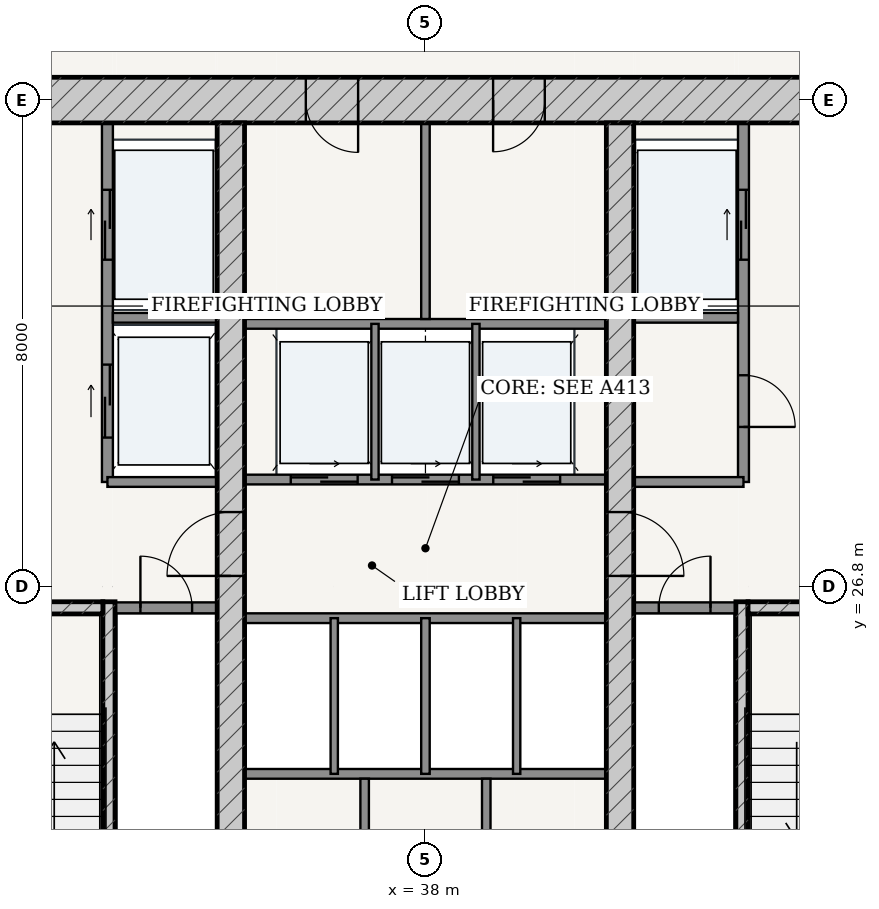
"""IFC4 building model, lengths in metres.
Left out: names, types, materials, properties, quantities, classifications, styles, units other than length and angle.
Written with IfcOpenShell. Run it as: python <this file> out.ifc"""

import sys

from ifc_helpers import new_model, si_unit, direction, frame, frame_2d, origin, place, context, subcontext, project, spatial, rectangle, extrude, source, transform, mapped, element, fill, save


model = new_model("IFC4")
c1 = context("Model", 3, precision=1e-05, world=origin(), true_north=direction((-0.2419218956, 0.970295726276)))
c2 = subcontext(c1, "Body", "Model", "MODEL_VIEW")
j1 = project(units=[si_unit("LENGTHUNIT", "METRE"), si_unit("PLANEANGLEUNIT", "RADIAN")], contexts=[c1])
p1 = place(None, origin())
s1 = spatial("IfcSite", under=j1, at=p1, CompositionType="ELEMENT")
p2 = place(p1, origin())
s2 = spatial("IfcBuilding", under=s1, at=p2, CompositionType="ELEMENT")
p3 = place(p2, frame((0.0, 0.0, 67.2)))
s3 = spatial("IfcBuildingStorey", under=s2, at=p3, CompositionType="ELEMENT", Elevation=67.2)
p4 = place(p3, frame((28.625, 34.8, 0.0), z_axis=(0.0, 0.0, 1.0), x_axis=(1.0, 0.0, 0.0)))
e1 = element("IfcWall", 1, at=p4, inside=s3, PredefinedType="SHEAR", context=c2, shape_type="SweptSolid", body=[
    extrude(rectangle(XDim=18.75, YDim=0.75, at=frame_2d((9.375, 0.0))), origin(), (0.0, 0.0, 1.0), 3.32),
])
p5 = place(p4, frame((7.407, 0.0, 0.0)))
e2 = element("IfcOpeningElement", 2, at=p5, cuts=e1, PredefinedType="OPENING", context=c2, shape_type="SweptSolid", body=[
    extrude(rectangle(XDim=0.86, YDim=2.1, at=frame_2d((0.43, 1.05))), frame((0.0, 0.385, 0.0), z_axis=(0.0, -1.0, 0.0), x_axis=(1.0, 0.0, 0.0)), (0.0, 0.0, 1.0), 0.77),
])
p6 = place(p4, frame((10.488, 0.0, 0.0)))
e3 = element("IfcOpeningElement", 3, at=p6, cuts=e1, PredefinedType="OPENING", context=c2, shape_type="SweptSolid", body=[
    extrude(rectangle(XDim=0.85, YDim=2.1, at=frame_2d((0.425, 1.05))), frame((0.0, 0.385, 0.0), z_axis=(0.0, -1.0, 0.0), x_axis=(1.0, 0.0, 0.0)), (0.0, 0.0, 1.0), 0.77),
])
p7 = place(p3, frame((32.795, 19.175, 0.0), z_axis=(0.0, 0.0, 1.0), x_axis=(0.0, 1.0, 0.0)))
e4 = element("IfcWall", 4, at=p7, inside=s3, PredefinedType="SOLIDWALL", context=c2, shape_type="SweptSolid", body=[
    extrude(rectangle(XDim=7.375, YDim=0.2, at=frame_2d((3.688, 0.0))), origin(), (0.0, 0.0, 1.0), 3.32),
])
p8 = place(p3, frame((29.375, 26.45, 0.0), z_axis=(0.0, 0.0, 1.0), x_axis=(1.0, 0.0, 0.0)))
e5 = element("IfcWall", 5, at=p8, inside=s3, PredefinedType="SOLIDWALL", context=c2, shape_type="SweptSolid", body=[
    extrude(rectangle(XDim=3.32, YDim=0.2, at=frame_2d((1.66, 0.0))), origin(), (0.0, 0.0, 1.0), 3.32),
])
p9 = place(p8, frame((1.185, 0.0, 0.0)))
e6 = element("IfcOpeningElement", 6, at=p9, cuts=e5, PredefinedType="OPENING", context=c2, shape_type="SweptSolid", body=[
    extrude(rectangle(XDim=0.95, YDim=2.15, at=frame_2d((0.475, 1.075))), frame((0.0, 0.11, 0.0), z_axis=(0.0, -1.0, 0.0), x_axis=(1.0, 0.0, 0.0)), (0.0, 0.0, 1.0), 0.22),
])
p10 = place(p3, frame((43.205, 19.175, 0.0), z_axis=(0.0, 0.0, 1.0), x_axis=(0.0, 1.0, 0.0)))
e7 = element("IfcWall", 7, at=p10, inside=s3, PredefinedType="SOLIDWALL", context=c2, shape_type="SweptSolid", body=[
    extrude(rectangle(XDim=7.375, YDim=0.2, at=frame_2d((3.688, 0.0))), origin(), (0.0, 0.0, 1.0), 3.32),
])
p11 = place(p3, frame((43.305, 26.45, 0.0), z_axis=(0.0, 0.0, 1.0), x_axis=(1.0, 0.0, 0.0)))
e8 = element("IfcWall", 8, at=p11, inside=s3, PredefinedType="SOLIDWALL", context=c2, shape_type="SweptSolid", body=[
    extrude(rectangle(XDim=3.32, YDim=0.2, at=frame_2d((1.66, 0.0))), origin(), (0.0, 0.0, 1.0), 3.32),
])
p12 = place(p11, frame((1.185, 0.0, 0.0)))
e9 = element("IfcOpeningElement", 9, at=p12, cuts=e8, PredefinedType="OPENING", context=c2, shape_type="SweptSolid", body=[
    extrude(rectangle(XDim=0.95, YDim=2.15, at=frame_2d((0.475, 1.075))), frame((0.0, 0.11, 0.0), z_axis=(0.0, -1.0, 0.0), x_axis=(1.0, 0.0, 0.0)), (0.0, 0.0, 1.0), 0.22),
])
p13 = place(p3, frame((34.8, 19.175, 0.0), z_axis=(0.0, 0.0, 1.0), x_axis=(0.0, 1.0, 0.0)))
e10 = element("IfcWall", 10, at=p13, inside=s3, PredefinedType="SHEAR", context=c2, shape_type="SweptSolid", body=[
    extrude(rectangle(XDim=15.25, YDim=0.45, at=frame_2d((7.625, 0.0))), origin(), (0.0, 0.0, 1.0), 3.32),
])
p14 = place(p13, frame((7.8, 0.0, 0.0)))
e11 = element("IfcOpeningElement", 11, at=p14, cuts=e10, PredefinedType="OPENING", context=c2, shape_type="SweptSolid", body=[
    extrude(rectangle(XDim=1.05, YDim=2.15, at=frame_2d((0.525, 1.075))), frame((0.0, 0.235, 0.0), z_axis=(0.0, -1.0, 0.0), x_axis=(1.0, 0.0, 0.0)), (0.0, 0.0, 1.0), 0.47),
])
p15 = place(p3, frame((41.2, 19.175, 0.0), z_axis=(0.0, 0.0, 1.0), x_axis=(0.0, 1.0, 0.0)))
e12 = element("IfcWall", 12, at=p15, inside=s3, PredefinedType="SHEAR", context=c2, shape_type="SweptSolid", body=[
    extrude(rectangle(XDim=15.25, YDim=0.45, at=frame_2d((7.625, 0.0))), origin(), (0.0, 0.0, 1.0), 3.32),
])
p16 = place(p15, frame((7.8, 0.0, 0.0)))
e13 = element("IfcOpeningElement", 13, at=p16, cuts=e12, PredefinedType="OPENING", context=c2, shape_type="SweptSolid", body=[
    extrude(rectangle(XDim=1.05, YDim=2.15, at=frame_2d((0.525, 1.075))), frame((0.0, 0.235, 0.0), z_axis=(0.0, -1.0, 0.0), x_axis=(1.0, 0.0, 0.0)), (0.0, 0.0, 1.0), 0.47),
])
p17 = place(p3, frame((32.9, 26.45, 0.0), z_axis=(0.0, 0.0, 1.0), x_axis=(1.0, 0.0, 0.0)))
e14 = element("IfcWall", 14, at=p17, inside=s3, PredefinedType="PARTITIONING", context=c2, shape_type="SweptSolid", body=[
    extrude(rectangle(XDim=1.675, YDim=0.18, at=frame_2d((0.837, 0.0))), origin(), (0.0, 0.0, 1.0), 3.32),
])
p18 = place(p17, frame((0.413, 0.0, 0.0)))
e15 = element("IfcOpeningElement", 15, at=p18, cuts=e14, PredefinedType="OPENING", context=c2, shape_type="SweptSolid", body=[
    extrude(rectangle(XDim=0.85, YDim=2.1, at=frame_2d((0.425, 1.05))), frame((0.0, 0.1, 0.0), z_axis=(0.0, -1.0, 0.0), x_axis=(1.0, 0.0, 0.0)), (0.0, 0.0, 1.0), 0.2),
])
p19 = place(p3, frame((41.425, 26.45, 0.0), z_axis=(0.0, 0.0, 1.0), x_axis=(1.0, 0.0, 0.0)))
e16 = element("IfcWall", 16, at=p19, inside=s3, PredefinedType="PARTITIONING", context=c2, shape_type="SweptSolid", body=[
    extrude(rectangle(XDim=1.675, YDim=0.18, at=frame_2d((0.837, 0.0))), origin(), (0.0, 0.0, 1.0), 3.32),
])
p20 = place(p19, frame((0.413, 0.0, 0.0)))
e17 = element("IfcOpeningElement", 17, at=p20, cuts=e16, PredefinedType="OPENING", context=c2, shape_type="SweptSolid", body=[
    extrude(rectangle(XDim=0.85, YDim=2.1, at=frame_2d((0.425, 1.05))), frame((0.0, 0.1, 0.0), z_axis=(0.0, -1.0, 0.0), x_axis=(1.0, 0.0, 0.0)), (0.0, 0.0, 1.0), 0.2),
])
p21 = place(p3, frame((32.77, 28.52, 0.0), z_axis=(0.0, 0.0, 1.0), x_axis=(0.0, 1.0, 0.0)))
e18 = element("IfcWall", 18, at=p21, inside=s3, PredefinedType="PARTITIONING", context=c2, shape_type="SweptSolid", body=[
    extrude(rectangle(XDim=5.905, YDim=0.18, at=frame_2d((2.953, 0.0))), origin(), (0.0, 0.0, 1.0), 3.32),
])
p22 = place(p21, frame((3.655, 0.0, 0.0)))
e19 = element("IfcOpeningElement", 19, at=p22, cuts=e18, PredefinedType="OPENING", context=c2, shape_type="SweptSolid", body=[
    extrude(rectangle(XDim=1.15, YDim=2.2, at=frame_2d((0.575, 1.1))), frame((0.0, 0.1, 0.0), z_axis=(0.0, -1.0, 0.0), x_axis=(1.0, 0.0, 0.0)), (0.0, 0.0, 1.0), 0.2),
])
p23 = place(p21, frame((0.73, 0.0, 0.0)))
e20 = element("IfcOpeningElement", 20, at=p23, cuts=e18, PredefinedType="OPENING", context=c2, shape_type="SweptSolid", body=[
    extrude(rectangle(XDim=1.2, YDim=2.25, at=frame_2d((0.6, 1.125))), frame((0.0, 0.1, 0.0), z_axis=(0.0, -1.0, 0.0), x_axis=(1.0, 0.0, 0.0)), (0.0, 0.0, 1.0), 0.2),
])
p24 = place(p3, frame((32.86, 31.22, 0.0), z_axis=(0.0, 0.0, 1.0), x_axis=(1.0, 0.0, 0.0)))
e21 = element("IfcWall", 21, at=p24, inside=s3, PredefinedType="PARTITIONING", context=c2, shape_type="SweptSolid", body=[
    extrude(rectangle(XDim=1.715, YDim=0.16, at=frame_2d((0.857, 0.0))), origin(), (0.0, 0.0, 1.0), 3.32),
])
p25 = place(p3, frame((32.77, 28.52, 0.0), z_axis=(0.0, 0.0, 1.0), x_axis=(1.0, 0.0, 0.0)))
e22 = element("IfcWall", 22, at=p25, inside=s3, PredefinedType="PARTITIONING", context=c2, shape_type="SweptSolid", body=[
    extrude(rectangle(XDim=1.805, YDim=0.16, at=frame_2d((0.902, 0.0))), origin(), (0.0, 0.0, 1.0), 3.32),
])
p26 = place(p3, frame((43.23, 28.52, 0.0), z_axis=(0.0, 0.0, 1.0), x_axis=(0.0, 1.0, 0.0)))
e23 = element("IfcWall", 23, at=p26, inside=s3, PredefinedType="PARTITIONING", context=c2, shape_type="SweptSolid", body=[
    extrude(rectangle(XDim=5.905, YDim=0.18, at=frame_2d((2.953, 0.0))), origin(), (0.0, 0.0, 1.0), 3.32),
])
p27 = place(p26, frame((0.905, 0.0, 0.0)))
e24 = element("IfcOpeningElement", 24, at=p27, cuts=e23, PredefinedType="OPENING", context=c2, shape_type="SweptSolid", body=[
    extrude(rectangle(XDim=0.85, YDim=2.1, at=frame_2d((0.425, 1.05))), frame((0.0, 0.1, 0.0), z_axis=(0.0, -1.0, 0.0), x_axis=(1.0, 0.0, 0.0)), (0.0, 0.0, 1.0), 0.2),
])
p28 = place(p26, frame((3.655, 0.0, 0.0)))
e25 = element("IfcOpeningElement", 25, at=p28, cuts=e23, PredefinedType="OPENING", context=c2, shape_type="SweptSolid", body=[
    extrude(rectangle(XDim=1.15, YDim=2.2, at=frame_2d((0.575, 1.1))), frame((0.0, 0.1, 0.0), z_axis=(0.0, -1.0, 0.0), x_axis=(1.0, 0.0, 0.0)), (0.0, 0.0, 1.0), 0.2),
])
p29 = place(p3, frame((41.425, 31.22, 0.0), z_axis=(0.0, 0.0, 1.0), x_axis=(1.0, 0.0, 0.0)))
e26 = element("IfcWall", 26, at=p29, inside=s3, PredefinedType="PARTITIONING", context=c2, shape_type="SweptSolid", body=[
    extrude(rectangle(XDim=1.715, YDim=0.16, at=frame_2d((0.857, 0.0))), origin(), (0.0, 0.0, 1.0), 3.32),
])
p30 = place(p3, frame((41.425, 28.52, 0.0), z_axis=(0.0, 0.0, 1.0), x_axis=(1.0, 0.0, 0.0)))
e27 = element("IfcWall", 27, at=p30, inside=s3, PredefinedType="PARTITIONING", context=c2, shape_type="SweptSolid", body=[
    extrude(rectangle(XDim=1.805, YDim=0.16, at=frame_2d((0.902, 0.0))), origin(), (0.0, 0.0, 1.0), 3.32),
])
p31 = place(p3, frame((35.025, 28.56, 0.0), z_axis=(0.0, 0.0, 1.0), x_axis=(1.0, 0.0, 0.0)))
e28 = element("IfcWall", 28, at=p31, inside=s3, PredefinedType="PARTITIONING", context=c2, shape_type="SweptSolid", body=[
    extrude(rectangle(XDim=5.95, YDim=0.16, at=frame_2d((2.975, 0.0))), origin(), (0.0, 0.0, 1.0), 3.32),
])
p32 = place(p31, frame((0.76, 0.0, 0.0)))
e29 = element("IfcOpeningElement", 29, at=p32, cuts=e28, PredefinedType="OPENING", context=c2, shape_type="SweptSolid", body=[
    extrude(rectangle(XDim=1.1, YDim=2.2, at=frame_2d((0.55, 1.1))), frame((0.0, 0.09, 0.0), z_axis=(0.0, -1.0, 0.0), x_axis=(1.0, 0.0, 0.0)), (0.0, 0.0, 1.0), 0.18),
])
p33 = place(p31, frame((2.425, 0.0, 0.0)))
e30 = element("IfcOpeningElement", 30, at=p33, cuts=e28, PredefinedType="OPENING", context=c2, shape_type="SweptSolid", body=[
    extrude(rectangle(XDim=1.1, YDim=2.2, at=frame_2d((0.55, 1.1))), frame((0.0, 0.09, 0.0), z_axis=(0.0, -1.0, 0.0), x_axis=(1.0, 0.0, 0.0)), (0.0, 0.0, 1.0), 0.18),
])
p34 = place(p31, frame((4.09, 0.0, 0.0)))
e31 = element("IfcOpeningElement", 31, at=p34, cuts=e28, PredefinedType="OPENING", context=c2, shape_type="SweptSolid", body=[
    extrude(rectangle(XDim=1.1, YDim=2.2, at=frame_2d((0.55, 1.1))), frame((0.0, 0.09, 0.0), z_axis=(0.0, -1.0, 0.0), x_axis=(1.0, 0.0, 0.0)), (0.0, 0.0, 1.0), 0.18),
])
p35 = place(p3, frame((35.025, 31.12, 0.0), z_axis=(0.0, 0.0, 1.0), x_axis=(1.0, 0.0, 0.0)))
e32 = element("IfcWall", 32, at=p35, inside=s3, PredefinedType="PARTITIONING", context=c2, shape_type="SweptSolid", body=[
    extrude(rectangle(XDim=5.95, YDim=0.16, at=frame_2d((2.975, 0.0))), origin(), (0.0, 0.0, 1.0), 3.32),
])
for number, where, z_axis, x_axis in (
    (33, (37.17, 28.56, 0.0), (0.0, 0.0, 1.0), (0.0, 1.0, 0.0)),
    (34, (38.83, 28.56, 0.0), (0.0, 0.0, 1.0), (0.0, 1.0, 0.0)),
):
    element("IfcWall", number, at=place(p3, frame(where, z_axis=z_axis, x_axis=x_axis)), inside=s3, PredefinedType="PARTITIONING", context=c2, shape_type="SweptSolid", body=[
        extrude(rectangle(XDim=2.56, YDim=0.12, at=frame_2d((1.28, 0.0))), origin(), (0.0, 0.0, 1.0), 3.32),
    ])
p36 = place(p3, frame((38.0, 31.2, 0.0), z_axis=(0.0, 0.0, 1.0), x_axis=(0.0, 1.0, 0.0)))
e35 = element("IfcWall", 35, at=p36, inside=s3, PredefinedType="PARTITIONING", context=c2, shape_type="SweptSolid", body=[
    extrude(rectangle(XDim=3.225, YDim=0.14, at=frame_2d((1.613, 0.0))), origin(), (0.0, 0.0, 1.0), 3.32),
])
for number, where, z_axis, x_axis in (
    (36, (35.025, 26.28, 0.0), (0.0, 0.0, 1.0), (1.0, 0.0, 0.0)),
    (37, (35.025, 23.72, 0.0), (0.0, 0.0, 1.0), (1.0, 0.0, 0.0)),
):
    element("IfcWall", number, at=place(p3, frame(where, z_axis=z_axis, x_axis=x_axis)), inside=s3, PredefinedType="PARTITIONING", context=c2, shape_type="SweptSolid", body=[
        extrude(rectangle(XDim=5.95, YDim=0.16, at=frame_2d((2.975, 0.0))), origin(), (0.0, 0.0, 1.0), 3.32),
    ])
p37 = place(p3, frame((36.5, 23.72, 0.0), z_axis=(0.0, 0.0, 1.0), x_axis=(0.0, 1.0, 0.0)))
e38 = element("IfcWall", 38, at=p37, inside=s3, PredefinedType="PARTITIONING", context=c2, shape_type="SweptSolid", body=[
    extrude(rectangle(XDim=2.56, YDim=0.12, at=frame_2d((1.28, 0.0))), origin(), (0.0, 0.0, 1.0), 3.32),
])
p38 = place(p3, frame((38.0, 23.72, 0.0), z_axis=(0.0, 0.0, 1.0), x_axis=(0.0, 1.0, 0.0)))
e39 = element("IfcWall", 39, at=p38, inside=s3, PredefinedType="PARTITIONING", context=c2, shape_type="SweptSolid", body=[
    extrude(rectangle(XDim=2.56, YDim=0.14, at=frame_2d((1.28, 0.0))), origin(), (0.0, 0.0, 1.0), 3.32),
])
p39 = place(p3, frame((39.5, 23.72, 0.0), z_axis=(0.0, 0.0, 1.0), x_axis=(0.0, 1.0, 0.0)))
e40 = element("IfcWall", 40, at=p39, inside=s3, PredefinedType="PARTITIONING", context=c2, shape_type="SweptSolid", body=[
    extrude(rectangle(XDim=2.56, YDim=0.12, at=frame_2d((1.28, 0.0))), origin(), (0.0, 0.0, 1.0), 3.32),
])
p40 = place(p3, frame((37.0, 19.175, 0.0), z_axis=(0.0, 0.0, 1.0), x_axis=(0.0, 1.0, 0.0)))
e41 = element("IfcWall", 41, at=p40, inside=s3, PredefinedType="PARTITIONING", context=c2, shape_type="SweptSolid", body=[
    extrude(rectangle(XDim=4.465, YDim=0.14, at=frame_2d((2.232, 0.0))), origin(), (0.0, 0.0, 1.0), 3.32),
])
p41 = place(p40, frame((1.808, 0.0, 0.0)))
e42 = element("IfcOpeningElement", 42, at=p41, cuts=e41, PredefinedType="OPENING", context=c2, shape_type="SweptSolid", body=[
    extrude(rectangle(XDim=0.85, YDim=2.1, at=frame_2d((0.425, 1.05))), frame((0.0, 0.08, 0.0), z_axis=(0.0, -1.0, 0.0), x_axis=(1.0, 0.0, 0.0)), (0.0, 0.0, 1.0), 0.16),
])
p42 = place(p3, frame((39.0, 19.175, 0.0), z_axis=(0.0, 0.0, 1.0), x_axis=(0.0, 1.0, 0.0)))
e43 = element("IfcWall", 43, at=p42, inside=s3, PredefinedType="PARTITIONING", context=c2, shape_type="SweptSolid", body=[
    extrude(rectangle(XDim=4.465, YDim=0.14, at=frame_2d((2.232, 0.0))), origin(), (0.0, 0.0, 1.0), 3.32),
])
p43 = place(p42, frame((1.808, 0.0, 0.0)))
e44 = element("IfcOpeningElement", 44, at=p43, cuts=e43, PredefinedType="OPENING", context=c2, shape_type="SweptSolid", body=[
    extrude(rectangle(XDim=0.85, YDim=2.1, at=frame_2d((0.425, 1.05))), frame((0.0, 0.08, 0.0), z_axis=(0.0, -1.0, 0.0), x_axis=(1.0, 0.0, 0.0)), (0.0, 0.0, 1.0), 0.16),
])
m1 = source(origin(), c2, "Body", "SweptSolid", [
    extrude(rectangle(XDim=1.05, YDim=2.15, at=frame_2d((0.525, 1.075))), frame((0.0, 0.025, 0.0), z_axis=(0.0, -1.0, 0.0), x_axis=(1.0, 0.0, 0.0)), (0.0, 0.0, 1.0), 0.05),
])
p44 = place(p14, origin())
e45 = element("IfcDoor", 45, at=p44, inside=s3, OperationType="SINGLE_SWING_LEFT", PredefinedType="DOOR", context=c2, shape_type="MappedRepresentation", body=[
    mapped(m1, transform((0.0, 0.0, 0.0), scale=1.0)),
])
fill(e11, e45)
p45 = place(p16, frame((1.05, 0.0, 0.0), z_axis=(0.0, 0.0, 1.0), x_axis=(-1.0, 0.0, 0.0)))
e46 = element("IfcDoor", 46, at=p45, inside=s3, OperationType="SINGLE_SWING_RIGHT", PredefinedType="DOOR", context=c2, shape_type="MappedRepresentation", body=[
    mapped(m1, transform((0.0, 0.0, 0.0), scale=1.0)),
])
fill(e13, e46)
m2 = source(origin(), c2, "Body", "SweptSolid", [
    extrude(rectangle(XDim=0.85, YDim=2.1, at=frame_2d((0.425, 1.05))), frame((0.0, 0.025, 0.0), z_axis=(0.0, -1.0, 0.0), x_axis=(1.0, 0.0, 0.0)), (0.0, 0.0, 1.0), 0.05),
])
p46 = place(p18, origin())
e47 = element("IfcDoor", 47, at=p46, inside=s3, OperationType="SINGLE_SWING_LEFT", PredefinedType="DOOR", context=c2, shape_type="MappedRepresentation", body=[
    mapped(m2, transform((0.0, 0.0, 0.0), scale=1.0)),
])
fill(e15, e47)
p47 = place(p20, origin())
e48 = element("IfcDoor", 48, at=p47, inside=s3, OperationType="SINGLE_SWING_RIGHT", PredefinedType="DOOR", context=c2, shape_type="MappedRepresentation", body=[
    mapped(m2, transform((0.0, 0.0, 0.0), scale=1.0)),
])
fill(e17, e48)
p48 = place(p27, frame((0.85, 0.0, 0.0), z_axis=(0.0, 0.0, 1.0), x_axis=(-1.0, 0.0, 0.0)))
e49 = element("IfcDoor", 49, at=p48, inside=s3, OperationType="SINGLE_SWING_RIGHT", PredefinedType="DOOR", context=c2, shape_type="MappedRepresentation", body=[
    mapped(m2, transform((0.0, 0.0, 0.0), scale=1.0)),
])
fill(e24, e49)
m3 = source(origin(), c2, "Body", "SweptSolid", [
    extrude(rectangle(XDim=0.86, YDim=2.1, at=frame_2d((0.43, 1.05))), frame((0.0, 0.025, 0.0), z_axis=(0.0, -1.0, 0.0), x_axis=(1.0, 0.0, 0.0)), (0.0, 0.0, 1.0), 0.05),
])
p49 = place(p5, frame((0.86, 0.0, 0.0), z_axis=(0.0, 0.0, 1.0), x_axis=(-1.0, 0.0, 0.0)))
e50 = element("IfcDoor", 50, at=p49, inside=s3, OperationType="SINGLE_SWING_LEFT", PredefinedType="DOOR", context=c2, shape_type="MappedRepresentation", body=[
    mapped(m3, transform((0.0, 0.0, 0.0), scale=1.0)),
])
fill(e2, e50)
p50 = place(p6, frame((0.85, 0.0, 0.0), z_axis=(0.0, 0.0, 1.0), x_axis=(-1.0, 0.0, 0.0)))
e51 = element("IfcDoor", 51, at=p50, inside=s3, OperationType="SINGLE_SWING_RIGHT", PredefinedType="DOOR", context=c2, shape_type="MappedRepresentation", body=[
    mapped(m2, transform((0.0, 0.0, 0.0), scale=1.0)),
])
fill(e3, e51)
m4 = source(origin(), c2, "Body", "SweptSolid", [
    extrude(rectangle(XDim=1.15, YDim=2.2, at=frame_2d((0.575, 1.1))), frame((0.0, 0.025, 0.0), z_axis=(0.0, -1.0, 0.0), x_axis=(1.0, 0.0, 0.0)), (0.0, 0.0, 1.0), 0.05),
])
p51 = place(p22, origin())
e52 = element("IfcDoor", 52, at=p51, inside=s3, OperationType="DOUBLE_DOOR_SLIDING", PredefinedType="DOOR", context=c2, shape_type="MappedRepresentation", body=[
    mapped(m4, transform((0.0, 0.0, 0.0), scale=1.0)),
])
fill(e19, e52)
p52 = place(p28, origin())
e53 = element("IfcDoor", 53, at=p52, inside=s3, OperationType="DOUBLE_DOOR_SLIDING", PredefinedType="DOOR", context=c2, shape_type="MappedRepresentation", body=[
    mapped(m4, transform((0.0, 0.0, 0.0), scale=1.0)),
])
fill(e25, e53)
m5 = source(origin(), c2, "Body", "SweptSolid", [
    extrude(rectangle(XDim=1.2, YDim=2.25, at=frame_2d((0.6, 1.125))), frame((0.0, 0.025, 0.0), z_axis=(0.0, -1.0, 0.0), x_axis=(1.0, 0.0, 0.0)), (0.0, 0.0, 1.0), 0.05),
])
p53 = place(p23, origin())
e54 = element("IfcDoor", 54, at=p53, inside=s3, OperationType="DOUBLE_DOOR_SLIDING", PredefinedType="DOOR", context=c2, shape_type="MappedRepresentation", body=[
    mapped(m5, transform((0.0, 0.0, 0.0), scale=1.0)),
])
fill(e20, e54)
m6 = source(origin(), c2, "Body", "SweptSolid", [
    extrude(rectangle(XDim=1.1, YDim=2.2, at=frame_2d((0.55, 1.1))), frame((0.0, 0.025, 0.0), z_axis=(0.0, -1.0, 0.0), x_axis=(1.0, 0.0, 0.0)), (0.0, 0.0, 1.0), 0.05),
])
p54 = place(p32, origin())
e55 = element("IfcDoor", 55, at=p54, inside=s3, OperationType="DOUBLE_DOOR_SLIDING", PredefinedType="DOOR", context=c2, shape_type="MappedRepresentation", body=[
    mapped(m6, transform((0.0, 0.0, 0.0), scale=1.0)),
])
fill(e29, e55)
p55 = place(p33, origin())
e56 = element("IfcDoor", 56, at=p55, inside=s3, OperationType="DOUBLE_DOOR_SLIDING", PredefinedType="DOOR", context=c2, shape_type="MappedRepresentation", body=[
    mapped(m6, transform((0.0, 0.0, 0.0), scale=1.0)),
])
fill(e30, e56)
p56 = place(p34, origin())
e57 = element("IfcDoor", 57, at=p56, inside=s3, OperationType="DOUBLE_DOOR_SLIDING", PredefinedType="DOOR", context=c2, shape_type="MappedRepresentation", body=[
    mapped(m6, transform((0.0, 0.0, 0.0), scale=1.0)),
])
fill(e31, e57)
save(model, sys.argv[1])
